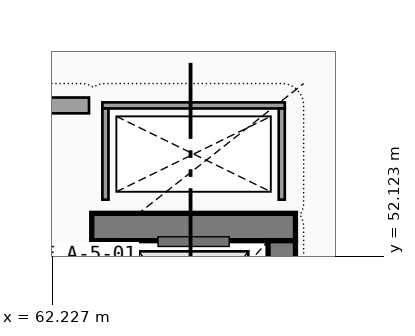
"""IFC4 building model, lengths in metres.
Left out: names, types, materials, properties, quantities, classifications, styles, units other than length and angle.
Written with IfcOpenShell. Run it as: python <this file> out.ifc"""

import sys

from ifc_helpers import new_model, si_unit, direction, frame, frame_2d, origin, place, context, subcontext, project, spatial, rectangle, extrude, element, save


model = new_model("IFC4")
c1 = context("Model", 3, precision=1e-05, world=origin(), true_north=direction((0.0, 1.0)))
c2 = subcontext(c1, "Body", "Model", "MODEL_VIEW")
j1 = project(units=[si_unit("LENGTHUNIT", "METRE"), si_unit("PLANEANGLEUNIT", "RADIAN")], contexts=[c1])
p1 = place(None, origin())
s1 = spatial("IfcSite", under=j1, at=p1, CompositionType="ELEMENT")
p2 = place(p1, origin())
s2 = spatial("IfcBuilding", under=s1, at=p2, CompositionType="ELEMENT")
p3 = place(p2, origin())
s3 = spatial("IfcBuildingStorey", under=s2, at=p3, CompositionType="ELEMENT", Elevation=0.0)
p4 = place(p3, frame((66.225, 52.6, 0.0), z_axis=(0.0, 0.0, 1.0), x_axis=(-1.0, 0.0, 0.0)))
e1 = element("IfcWall", 1, at=p4, inside=s3, PredefinedType="SHEAR", context=c2, shape_type="SweptSolid", body=[
    extrude(rectangle(XDim=3.35, YDim=0.45, at=frame_2d((1.675, 0.0))), origin(), (0.0, 0.0, 1.0), 4.5),
])
p5 = place(p3, frame((63.1, 52.375, 0.0), z_axis=(0.0, 0.0, 1.0), x_axis=(0.0, -1.0, 0.0)))
e2 = element("IfcWall", 2, at=p5, inside=s3, PredefinedType="SHEAR", context=c2, shape_type="SweptSolid", body=[
    extrude(rectangle(XDim=2.75, YDim=0.45, at=frame_2d((1.375, 0.0))), origin(), (0.0, 0.0, 1.0), 4.5),
])
p6 = place(p5, frame((0.725, 0.0, 0.0), z_axis=(0.0, 0.0, 1.0), x_axis=(1.0, 0.0, 0.0)))
e3 = element("IfcOpeningElement", 3, at=p6, cuts=e2, PredefinedType="OPENING", context=c2, shape_type="SweptSolid", body=[
    extrude(rectangle(XDim=1.3, YDim=2.25, at=frame_2d((0.65, 1.125))), frame((0.0, 0.235, 0.0), z_axis=(0.0, -1.0, 0.0), x_axis=(1.0, 0.0, 0.0)), (0.0, 0.0, 1.0), 0.47),
])
p7 = place(p3, frame((66.0, 49.625, 0.0), z_axis=(0.0, 0.0, 1.0), x_axis=(0.0, 1.0, 0.0)))
e4 = element("IfcWall", 4, at=p7, inside=s3, PredefinedType="SHEAR", context=c2, shape_type="SweptSolid", body=[
    extrude(rectangle(XDim=2.75, YDim=0.45, at=frame_2d((1.375, 0.0))), origin(), (0.0, 0.0, 1.0), 4.5),
])
p8 = place(p3, frame((66.05, 54.6, 0.0), z_axis=(0.0, 0.0, 1.0), x_axis=(-1.0, 0.0, 0.0)))
e5 = element("IfcWall", 5, at=p8, inside=s3, PredefinedType="PARTITIONING", context=c2, shape_type="SweptSolid", body=[
    extrude(rectangle(XDim=3.0, YDim=0.1, at=frame_2d((1.5, 0.0))), origin(), (0.0, 0.0, 1.0), 4.5),
])
for number, where, z_axis, x_axis in (
    (6, (63.1, 54.55, 0.0), (0.0, 0.0, 1.0), (0.0, -1.0, 0.0)),
    (7, (66.0, 53.05, 0.0), (0.0, 0.0, 1.0), (0.0, 1.0, 0.0)),
):
    element("IfcWall", number, at=place(p3, frame(where, z_axis=z_axis, x_axis=x_axis)), inside=s3, PredefinedType="PARTITIONING", context=c2, shape_type="SweptSolid", body=[
        extrude(rectangle(XDim=1.5, YDim=0.1, at=frame_2d((0.75, 0.0))), origin(), (0.0, 0.0, 1.0), 4.5),
    ])
p9 = place(p3, frame((62.83, 54.6, 0.0), z_axis=(0.0, 0.0, 1.0), x_axis=(-1.0, 0.0, 0.0)))
e8 = element("IfcWall", 8, at=p9, inside=s3, PredefinedType="SOLIDWALL", context=c2, shape_type="SweptSolid", body=[
    extrude(rectangle(XDim=3.76, YDim=0.26, at=frame_2d((1.88, 0.0))), origin(), (0.0, 0.0, 1.0), 4.5),
])
save(model, sys.argv[1])
